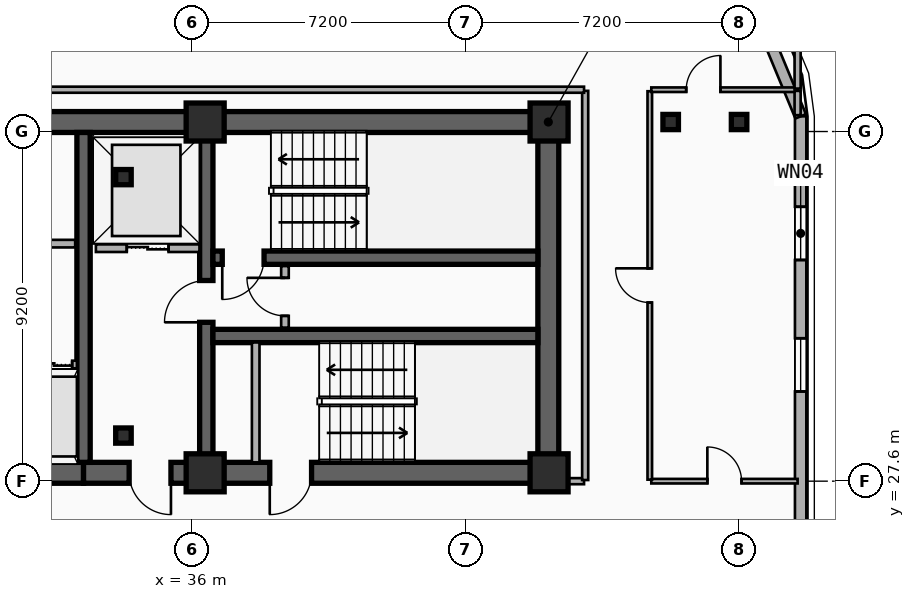
"""IFC4 building model, lengths in metres.
Left out: names, types, materials, properties, quantities, classifications, styles, units other than length and angle.
Written with IfcOpenShell. Run it as: python <this file> out.ifc"""

import sys

from ifc_helpers import new_model, si_unit, direction, frame, frame_2d, origin, origin_2d, place, context, subcontext, project, spatial, rectangle, i_section, extrude, element, fill, save


model = new_model("IFC4")
c1 = context("Model", 3, precision=1e-05, world=origin(), true_north=direction((0.0, 1.0)))
c2 = subcontext(c1, "Body", "Model", "MODEL_VIEW")
j1 = project(units=[si_unit("LENGTHUNIT", "METRE"), si_unit("PLANEANGLEUNIT", "RADIAN")], contexts=[c1])
p1 = place(None, origin())
s1 = spatial("IfcSite", under=j1, at=p1, CompositionType="ELEMENT")
p2 = place(p1, origin())
s2 = spatial("IfcBuilding", under=s1, at=p2, CompositionType="ELEMENT")
p3 = place(p2, frame((0.0, 0.0, 193.2)))
s3 = spatial("IfcBuildingStorey", under=s2, at=p3, CompositionType="ELEMENT", Elevation=193.2)
p4 = place(p3, frame((12.15, 37.05, 0.0), z_axis=(0.0, 0.0, 1.0), x_axis=(1.0, 0.0, 0.0)))
e1 = element("IfcWall", 1, at=p4, inside=s3, PredefinedType="SHEAR", context=c2, shape_type="SweptSolid", body=[
    extrude(rectangle(XDim=33.23, YDim=0.55, at=frame_2d((16.615, 0.0))), origin(), (0.0, 0.0, 1.0), 3.6),
])
p5 = place(p3, frame((33.15, 27.82, 0.0), z_axis=(0.0, 0.0, 1.0), x_axis=(-1.0, 0.0, 0.0)))
e2 = element("IfcWall", 2, at=p5, inside=s3, PredefinedType="SHEAR", context=c2, shape_type="SweptSolid", body=[
    extrude(rectangle(XDim=11.97, YDim=0.55, at=frame_2d((5.985, 0.0))), origin(), (0.0, 0.0, 1.0), 3.6),
])
p6 = place(p5, frame((6.1, 0.0, 0.0)))
e3 = element("IfcOpeningElement", 3, at=p6, cuts=e2, PredefinedType="OPENING", context=c2, shape_type="SweptSolid", body=[
    extrude(rectangle(XDim=1.6, YDim=2.2, at=frame_2d((0.8, 1.1))), frame((0.0, 0.285, 0.0), z_axis=(0.0, -1.0, 0.0), x_axis=(1.0, 0.0, 0.0)), (0.0, 0.0, 1.0), 0.57),
])
p7 = place(p3, frame((45.38, 27.82, 0.0), z_axis=(0.0, 0.0, 1.0), x_axis=(-1.0, 0.0, 0.0)))
e4 = element("IfcWall", 4, at=p7, inside=s3, PredefinedType="SHEAR", context=c2, shape_type="SweptSolid", body=[
    extrude(rectangle(XDim=12.23, YDim=0.55, at=frame_2d((6.115, 0.0))), origin(), (0.0, 0.0, 1.0), 3.6),
])
p8 = place(p7, frame((9.93, 0.0, 0.0)))
e5 = element("IfcOpeningElement", 5, at=p8, cuts=e4, PredefinedType="OPENING", context=c2, shape_type="SweptSolid", body=[
    extrude(rectangle(XDim=1.1, YDim=2.15, at=frame_2d((0.55, 1.075))), frame((0.0, 0.285, 0.0), z_axis=(0.0, -1.0, 0.0), x_axis=(1.0, 0.0, 0.0)), (0.0, 0.0, 1.0), 0.57),
])
p9 = place(p7, frame((6.23, 0.0, 0.0)))
e6 = element("IfcOpeningElement", 6, at=p9, cuts=e4, PredefinedType="OPENING", context=c2, shape_type="SweptSolid", body=[
    extrude(rectangle(XDim=1.1, YDim=2.15, at=frame_2d((0.55, 1.075))), frame((0.0, 0.285, 0.0), z_axis=(0.0, -1.0, 0.0), x_axis=(1.0, 0.0, 0.0)), (0.0, 0.0, 1.0), 0.57),
])
p10 = place(p3, frame((45.38, 28.095, 0.0), z_axis=(0.0, 0.0, 1.0), x_axis=(0.0, 1.0, 0.0)))
e7 = element("IfcWall", 7, at=p10, inside=s3, PredefinedType="SHEAR", context=c2, shape_type="SweptSolid", body=[
    extrude(rectangle(XDim=8.68, YDim=0.55, at=frame_2d((4.34, 0.0))), origin(), (0.0, 0.0, 1.0), 3.6),
])
p11 = place(p3, frame((33.15, 28.095, 0.0), z_axis=(0.0, 0.0, 1.0), x_axis=(0.0, 1.0, 0.0)))
e8 = element("IfcWall", 8, at=p11, inside=s3, PredefinedType="SHEAR", context=c2, shape_type="SweptSolid", body=[
    extrude(rectangle(XDim=8.68, YDim=0.35, at=frame_2d((4.34, 0.0))), origin(), (0.0, 0.0, 1.0), 3.6),
])
p12 = place(p3, frame((36.38, 28.095, 0.0), z_axis=(0.0, 0.0, 1.0), x_axis=(0.0, 1.0, 0.0)))
e9 = element("IfcWall", 9, at=p12, inside=s3, PredefinedType="SHEAR", context=c2, shape_type="SweptSolid", body=[
    extrude(rectangle(XDim=8.68, YDim=0.35, at=frame_2d((4.34, 0.0))), origin(), (0.0, 0.0, 1.0), 3.6),
])
p13 = place(p12, frame((3.685, 0.0, 0.0)))
e10 = element("IfcOpeningElement", 10, at=p13, cuts=e9, PredefinedType="OPENING", context=c2, shape_type="SweptSolid", body=[
    extrude(rectangle(XDim=1.1, YDim=2.15, at=frame_2d((0.55, 1.075))), frame((0.0, 0.185, 0.0), z_axis=(0.0, -1.0, 0.0), x_axis=(1.0, 0.0, 0.0)), (0.0, 0.0, 1.0), 0.37),
])
p14 = place(p3, frame((45.105, 33.48, 0.0), z_axis=(0.0, 0.0, 1.0), x_axis=(-1.0, 0.0, 0.0)))
e11 = element("IfcWall", 11, at=p14, inside=s3, PredefinedType="SHEAR", context=c2, shape_type="SweptSolid", body=[
    extrude(rectangle(XDim=8.55, YDim=0.35, at=frame_2d((4.275, 0.0))), origin(), (0.0, 0.0, 1.0), 3.6),
])
p15 = place(p14, frame((7.205, 0.0, 0.0)))
e12 = element("IfcOpeningElement", 12, at=p15, cuts=e11, PredefinedType="OPENING", context=c2, shape_type="SweptSolid", body=[
    extrude(rectangle(XDim=1.1, YDim=2.15, at=frame_2d((0.55, 1.075))), frame((0.0, 0.185, 0.0), z_axis=(0.0, -1.0, 0.0), x_axis=(1.0, 0.0, 0.0)), (0.0, 0.0, 1.0), 0.37),
])
p16 = place(p3, frame((36.555, 31.42, 0.0), z_axis=(0.0, 0.0, 1.0), x_axis=(1.0, 0.0, 0.0)))
e13 = element("IfcWall", 13, at=p16, inside=s3, PredefinedType="SHEAR", context=c2, shape_type="SweptSolid", body=[
    extrude(rectangle(XDim=8.55, YDim=0.35, at=frame_2d((4.275, 0.0))), origin(), (0.0, 0.0, 1.0), 3.6),
])
for number, where, z_axis, x_axis in (
    (14, (34.2, 28.8, 0.0), (0.0, 0.0, 1.0), (1.0, 0.0, 0.0)),
    (15, (34.2, 35.6, 0.0), (0.0, 0.0, 1.0), (1.0, 0.0, 0.0)),
):
    element("IfcColumn", number, at=place(p3, frame(where, z_axis=z_axis, x_axis=x_axis)), inside=s3, PredefinedType="COLUMN", context=c2, shape_type="SweptSolid", body=[
        extrude(i_section(OverallWidth=0.408, OverallDepth=0.4, WebThickness=0.025, FlangeThickness=0.039, FilletRadius=0.015, at=origin_2d()), origin(), (0.0, 0.0, 1.0), 3.6),
    ])
for number, where, z_axis, x_axis in (
    (16, (36.35, 27.82, 0.0), (0.0, 0.0, 1.0), (1.0, 0.0, 0.0)),
    (17, (36.35, 37.05, 0.0), (0.0, 0.0, 1.0), (1.0, 0.0, 0.0)),
    (18, (45.4, 27.82, 0.0), (0.0, 0.0, 1.0), (1.0, 0.0, 0.0)),
    (19, (45.4, 37.05, 0.0), (0.0, 0.0, 1.0), (1.0, 0.0, 0.0)),
):
    element("IfcColumn", number, at=place(p3, frame(where, z_axis=z_axis, x_axis=x_axis)), inside=s3, PredefinedType="COLUMN", context=c2, shape_type="SweptSolid", body=[
        extrude(rectangle(XDim=1.0, YDim=1.0, at=origin_2d()), origin(), (0.0, 0.0, 1.0), 3.6),
    ])
for number, where, z_axis, x_axis in (
    (20, (48.6, 37.05, 0.0), (0.0, 0.0, 1.0), (1.0, 0.0, 0.0)),
    (21, (50.4, 37.05, 0.0), (0.0, 0.0, 1.0), (1.0, 0.0, 0.0)),
):
    element("IfcColumn", number, at=place(p3, frame(where, z_axis=z_axis, x_axis=x_axis)), inside=s3, PredefinedType="COLUMN", context=c2, shape_type="SweptSolid", body=[
        extrude(i_section(OverallWidth=0.408, OverallDepth=0.4, WebThickness=0.025, FlangeThickness=0.039, FilletRadius=0.015, at=origin_2d()), origin(), (0.0, 0.0, 1.0), 3.6),
    ])
p17 = place(p3, frame((52.02, 37.2, 0.0), z_axis=(0.0, 0.0, 1.0), x_axis=(0.0, -1.0, 0.0)))
e22 = element("IfcWall", 22, at=p17, inside=s3, PredefinedType="SOLIDWALL", context=c2, shape_type="SweptSolid", body=[
    extrude(rectangle(XDim=28.6, YDim=0.3, at=frame_2d((14.3, 0.0))), origin(), (0.0, 0.0, 1.0), 3.34),
])
p18 = place(p17, frame((2.38, 0.0, 0.34)))
e23 = element("IfcOpeningElement", 23, at=p18, cuts=e22, PredefinedType="OPENING", context=c2, shape_type="SweptSolid", body=[
    extrude(rectangle(XDim=1.4, YDim=2.1, at=frame_2d((0.7, 1.05))), frame((0.0, 0.16, 0.0), z_axis=(0.0, -1.0, 0.0), x_axis=(1.0, 0.0, 0.0)), (0.0, 0.0, 1.0), 0.32),
])
p19 = place(p17, frame((5.84, 0.0, 0.34)))
e24 = element("IfcOpeningElement", 24, at=p19, cuts=e22, PredefinedType="OPENING", context=c2, shape_type="SweptSolid", body=[
    extrude(rectangle(XDim=1.4, YDim=2.1, at=frame_2d((0.7, 1.05))), frame((0.0, 0.16, 0.0), z_axis=(0.0, -1.0, 0.0), x_axis=(1.0, 0.0, 0.0)), (0.0, 0.0, 1.0), 0.32),
])
p20 = place(p17, frame((16.527, 0.0, 0.34)))
e25 = element("IfcOpeningElement", 25, at=p20, cuts=e22, PredefinedType="OPENING", context=c2, shape_type="SweptSolid", body=[
    extrude(rectangle(XDim=1.4, YDim=2.1, at=frame_2d((0.7, 1.05))), frame((0.0, 0.16, 0.0), z_axis=(0.0, -1.0, 0.0), x_axis=(1.0, 0.0, 0.0)), (0.0, 0.0, 1.0), 0.32),
])
p21 = place(p17, frame((22.403, 0.0, 0.34)))
e26 = element("IfcOpeningElement", 26, at=p21, cuts=e22, PredefinedType="OPENING", context=c2, shape_type="SweptSolid", body=[
    extrude(rectangle(XDim=1.4, YDim=2.1, at=frame_2d((0.7, 1.05))), frame((0.0, 0.16, 0.0), z_axis=(0.0, -1.0, 0.0), x_axis=(1.0, 0.0, 0.0)), (0.0, 0.0, 1.0), 0.32),
])
p22 = place(p3, frame((50.843, 40.042, 0.0), z_axis=(0.0, 0.0, 1.0), x_axis=(0.382704529509, -0.923870793506, 0.0)))
e27 = element("IfcWall", 27, at=p22, inside=s3, PredefinedType="SOLIDWALL", context=c2, shape_type="SweptSolid", body=[
    extrude(rectangle(XDim=3.077, YDim=0.3, at=frame_2d((1.538, 0.0))), origin(), (0.0, 0.0, 1.0), 3.34),
])
p23 = place(p3, frame((33.475, 33.73, 0.0), z_axis=(0.0, 0.0, 1.0), x_axis=(1.0, 0.0, 0.0)))
e28 = element("IfcWall", 28, at=p23, inside=s3, PredefinedType="PARTITIONING", context=c2, shape_type="SweptSolid", body=[
    extrude(rectangle(XDim=2.725, YDim=0.2, at=frame_2d((1.362, 0.0))), origin(), (0.0, 0.0, 1.0), 2.41),
])
p24 = place(p23, frame((0.812, 0.0, 0.0)))
e29 = element("IfcOpeningElement", 29, at=p24, cuts=e28, PredefinedType="OPENING", context=c2, shape_type="SweptSolid", body=[
    extrude(rectangle(XDim=1.1, YDim=2.15, at=frame_2d((0.55, 1.075))), frame((0.0, 0.11, 0.0), z_axis=(0.0, -1.0, 0.0), x_axis=(1.0, 0.0, 0.0)), (0.0, 0.0, 1.0), 0.22),
])
p25 = place(p3, frame((31.775, 30.67, 0.0), z_axis=(0.0, 0.0, 1.0), x_axis=(1.0, 0.0, 0.0)))
e30 = element("IfcWall", 30, at=p25, inside=s3, PredefinedType="PARTITIONING", context=c2, shape_type="SweptSolid", body=[
    extrude(rectangle(XDim=1.2, YDim=0.2, at=frame_2d((0.6, 0.0))), origin(), (0.0, 0.0, 1.0), 2.72),
])
p26 = place(p25, frame((0.125, 0.0, 0.0)))
e31 = element("IfcOpeningElement", 31, at=p26, cuts=e30, PredefinedType="OPENING", context=c2, shape_type="SweptSolid", body=[
    extrude(rectangle(XDim=0.95, YDim=2.15, at=frame_2d((0.475, 1.075))), frame((0.0, 0.11, 0.0), z_axis=(0.0, -1.0, 0.0), x_axis=(1.0, 0.0, 0.0)), (0.0, 0.0, 1.0), 0.22),
])
p27 = place(p3, frame((37.68, 28.095, 0.0), z_axis=(0.0, 0.0, 1.0), x_axis=(0.0, 1.0, 0.0)))
e32 = element("IfcWall", 32, at=p27, inside=s3, PredefinedType="PARTITIONING", context=c2, shape_type="SweptSolid", body=[
    extrude(rectangle(XDim=3.155, YDim=0.2, at=frame_2d((1.578, 0.0))), origin(), (0.0, 0.0, 1.0), 2.72),
])
p28 = place(p3, frame((38.45, 31.64, 0.0), z_axis=(0.0, 0.0, 1.0), x_axis=(0.0, 1.0, 0.0)))
e33 = element("IfcWall", 33, at=p28, inside=s3, PredefinedType="PARTITIONING", context=c2, shape_type="SweptSolid", body=[
    extrude(rectangle(XDim=1.62, YDim=0.2, at=frame_2d((0.81, 0.0))), origin(), (0.0, 0.0, 1.0), 3.34),
])
p29 = place(p28, frame((0.31, 0.0, 0.0)))
e34 = element("IfcOpeningElement", 34, at=p29, cuts=e33, PredefinedType="OPENING", context=c2, shape_type="SweptSolid", body=[
    extrude(rectangle(XDim=1.0, YDim=2.15, at=frame_2d((0.5, 1.075))), frame((0.0, 0.11, 0.0), z_axis=(0.0, -1.0, 0.0), x_axis=(1.0, 0.0, 0.0)), (0.0, 0.0, 1.0), 0.22),
])
p30 = place(p3, frame((21.59, 33.85, 0.0), z_axis=(0.0, 0.0, 1.0), x_axis=(1.0, 0.0, 0.0)))
e35 = element("IfcWall", 35, at=p30, inside=s3, PredefinedType="PARTITIONING", context=c2, shape_type="SweptSolid", body=[
    extrude(rectangle(XDim=11.34, YDim=0.2, at=frame_2d((5.67, 0.0))), origin(), (0.0, 0.0, 1.0), 2.41),
])
p31 = place(p30, frame((5.07, 0.0, 0.0)))
e36 = element("IfcOpeningElement", 36, at=p31, cuts=e35, PredefinedType="OPENING", context=c2, shape_type="SweptSolid", body=[
    extrude(rectangle(XDim=1.2, YDim=2.15, at=frame_2d((0.6, 1.075))), frame((0.0, 0.11, 0.0), z_axis=(0.0, -1.0, 0.0), x_axis=(1.0, 0.0, 0.0)), (0.0, 0.0, 1.0), 0.22),
])
p32 = place(p3, frame((48.09, 27.6, 0.0), z_axis=(0.0, 0.0, 1.0), x_axis=(1.0, 0.0, 0.0)))
e37 = element("IfcWall", 37, at=p32, inside=s3, PredefinedType="PARTITIONING", context=c2, shape_type="SweptSolid", body=[
    extrude(rectangle(XDim=3.85, YDim=0.12, at=frame_2d((1.925, 0.0))), origin(), (0.0, 0.0, 1.0), 2.67),
])
p33 = place(p32, frame((1.475, 0.0, 0.0)))
e38 = element("IfcOpeningElement", 38, at=p33, cuts=e37, PredefinedType="OPENING", context=c2, shape_type="SweptSolid", body=[
    extrude(rectangle(XDim=0.9, YDim=2.1, at=frame_2d((0.45, 1.05))), frame((0.0, 0.07, 0.0), z_axis=(0.0, -1.0, 0.0), x_axis=(1.0, 0.0, 0.0)), (0.0, 0.0, 1.0), 0.14),
])
p34 = place(p3, frame((48.05, 27.64, 0.0), z_axis=(0.0, 0.0, 1.0), x_axis=(0.0, 1.0, 0.0)))
e39 = element("IfcWall", 39, at=p34, inside=s3, PredefinedType="PARTITIONING", context=c2, shape_type="SweptSolid", body=[
    extrude(rectangle(XDim=10.22, YDim=0.12, at=frame_2d((5.11, 0.0))), origin(), (0.0, 0.0, 1.0), 2.82),
])
p35 = place(p34, frame((4.66, 0.0, 0.0)))
e40 = element("IfcOpeningElement", 40, at=p35, cuts=e39, PredefinedType="OPENING", context=c2, shape_type="SweptSolid", body=[
    extrude(rectangle(XDim=0.9, YDim=2.1, at=frame_2d((0.45, 1.05))), frame((0.0, 0.07, 0.0), z_axis=(0.0, -1.0, 0.0), x_axis=(1.0, 0.0, 0.0)), (0.0, 0.0, 1.0), 0.14),
])
p36 = place(p3, frame((48.09, 37.9, 0.0), z_axis=(0.0, 0.0, 1.0), x_axis=(1.0, 0.0, 0.0)))
e41 = element("IfcWall", 41, at=p36, inside=s3, PredefinedType="PARTITIONING", context=c2, shape_type="SweptSolid", body=[
    extrude(rectangle(XDim=3.85, YDim=0.12, at=frame_2d((1.925, 0.0))), origin(), (0.0, 0.0, 1.0), 3.34),
])
p37 = place(p36, frame((0.919, 0.0, 0.0)))
e42 = element("IfcOpeningElement", 42, at=p37, cuts=e41, PredefinedType="OPENING", context=c2, shape_type="SweptSolid", body=[
    extrude(rectangle(XDim=0.9, YDim=2.1, at=frame_2d((0.45, 1.05))), frame((0.0, 0.07, 0.0), z_axis=(0.0, -1.0, 0.0), x_axis=(1.0, 0.0, 0.0)), (0.0, 0.0, 1.0), 0.14),
])
p38 = place(p3, frame((45.41, 27.6, 0.0), z_axis=(0.0, 0.0, 1.0), x_axis=(1.0, 0.0, 0.0)))
e43 = element("IfcWall", 43, at=p38, inside=s3, PredefinedType="PARTITIONING", context=c2, shape_type="SweptSolid", body=[
    extrude(rectangle(XDim=0.91, YDim=0.16, at=frame_2d((0.455, 0.0))), origin(), (0.0, 0.0, 1.0), 2.41),
])
p39 = place(p3, frame((46.35, 27.63, 0.0), z_axis=(0.0, 0.0, 1.0), x_axis=(0.0, 1.0, 0.0)))
e44 = element("IfcWall", 44, at=p39, inside=s3, PredefinedType="PARTITIONING", context=c2, shape_type="SweptSolid", body=[
    extrude(rectangle(XDim=10.24, YDim=0.16, at=frame_2d((5.12, 0.0))), origin(), (0.0, 0.0, 1.0), 2.82),
])
p40 = place(p3, frame((11.28, 37.9, 0.0), z_axis=(0.0, 0.0, 1.0), x_axis=(1.0, 0.0, 0.0)))
e45 = element("IfcWall", 45, at=p40, inside=s3, PredefinedType="PARTITIONING", context=c2, shape_type="SweptSolid", body=[
    extrude(rectangle(XDim=35.04, YDim=0.16, at=frame_2d((17.52, 0.0))), origin(), (0.0, 0.0, 1.0), 3.34),
])
p41 = place(p3, frame((51.94, 37.93, 0.0), z_axis=(0.0, 0.0, 1.0), x_axis=(0.0, 1.0, 0.0)))
e46 = element("IfcWall", 46, at=p41, inside=s3, PredefinedType="PARTITIONING", context=c2, shape_type="SweptSolid", body=[
    extrude(rectangle(XDim=1.44, YDim=0.16, at=frame_2d((0.72, 0.0))), origin(), (0.0, 0.0, 1.0), 3.34),
])
p42 = place(p3, frame((51.94, 37.23, 0.0), z_axis=(0.0, 0.0, 1.0), x_axis=(0.0, 1.0, 0.0)))
e47 = element("IfcWall", 47, at=p42, inside=s3, PredefinedType="PARTITIONING", context=c2, shape_type="SweptSolid", body=[
    extrude(rectangle(XDim=0.64, YDim=0.16, at=frame_2d((0.32, 0.0))), origin(), (0.0, 0.0, 1.0), 3.34),
])
p43 = place(p18, origin())
e48 = element("IfcWindow", 48, at=p43, inside=s3, PartitioningType="SINGLE_PANEL", PredefinedType="WINDOW", context=c2, shape_type="SweptSolid", body=[
    extrude(rectangle(XDim=1.4, YDim=2.1, at=frame_2d((0.7, 1.05))), frame((0.0, 0.03, 0.0), z_axis=(0.0, -1.0, 0.0), x_axis=(1.0, 0.0, 0.0)), (0.0, 0.0, 1.0), 0.06),
])
fill(e23, e48)
p44 = place(p19, origin())
e49 = element("IfcWindow", 49, at=p44, inside=s3, PartitioningType="SINGLE_PANEL", PredefinedType="WINDOW", context=c2, shape_type="SweptSolid", body=[
    extrude(rectangle(XDim=1.4, YDim=2.1, at=frame_2d((0.7, 1.05))), frame((0.0, 0.03, 0.0), z_axis=(0.0, -1.0, 0.0), x_axis=(1.0, 0.0, 0.0)), (0.0, 0.0, 1.0), 0.06),
])
fill(e24, e49)
p45 = place(p24, origin())
e50 = element("IfcDoor", 50, at=p45, inside=s3, OperationType="DOUBLE_DOOR_SLIDING", PredefinedType="DOOR", context=c2, shape_type="SweptSolid", body=[
    extrude(rectangle(XDim=1.1, YDim=2.15, at=frame_2d((0.55, 1.075))), frame((0.0, 0.025, 0.0), z_axis=(0.0, -1.0, 0.0), x_axis=(1.0, 0.0, 0.0)), (0.0, 0.0, 1.0), 0.05),
])
fill(e29, e50)
p46 = place(p26, origin())
e51 = element("IfcDoor", 51, at=p46, inside=s3, OperationType="DOUBLE_DOOR_SLIDING", PredefinedType="DOOR", context=c2, shape_type="SweptSolid", body=[
    extrude(rectangle(XDim=0.95, YDim=2.15, at=frame_2d((0.475, 1.075))), frame((0.0, 0.025, 0.0), z_axis=(0.0, -1.0, 0.0), x_axis=(1.0, 0.0, 0.0)), (0.0, 0.0, 1.0), 0.05),
])
fill(e31, e51)
p47 = place(p15, origin())
e52 = element("IfcDoor", 52, at=p47, inside=s3, OperationType="SINGLE_SWING_RIGHT", PredefinedType="DOOR", context=c2, shape_type="SweptSolid", body=[
    extrude(rectangle(XDim=1.1, YDim=2.15, at=frame_2d((0.55, 1.075))), frame((0.0, 0.025, 0.0), z_axis=(0.0, -1.0, 0.0), x_axis=(1.0, 0.0, 0.0)), (0.0, 0.0, 1.0), 0.05),
])
fill(e12, e52)
p48 = place(p13, origin())
e53 = element("IfcDoor", 53, at=p48, inside=s3, OperationType="SINGLE_SWING_LEFT", PredefinedType="DOOR", context=c2, shape_type="SweptSolid", body=[
    extrude(rectangle(XDim=1.1, YDim=2.15, at=frame_2d((0.55, 1.075))), frame((0.0, 0.025, 0.0), z_axis=(0.0, -1.0, 0.0), x_axis=(1.0, 0.0, 0.0)), (0.0, 0.0, 1.0), 0.05),
])
fill(e10, e53)
p49 = place(p8, origin())
e54 = element("IfcDoor", 54, at=p49, inside=s3, OperationType="SINGLE_SWING_LEFT", PredefinedType="DOOR", context=c2, shape_type="SweptSolid", body=[
    extrude(rectangle(XDim=1.1, YDim=2.15, at=frame_2d((0.55, 1.075))), frame((0.0, 0.025, 0.0), z_axis=(0.0, -1.0, 0.0), x_axis=(1.0, 0.0, 0.0)), (0.0, 0.0, 1.0), 0.05),
])
fill(e5, e54)
p50 = place(p9, origin())
e55 = element("IfcDoor", 55, at=p50, inside=s3, OperationType="SINGLE_SWING_RIGHT", PredefinedType="DOOR", context=c2, shape_type="SweptSolid", body=[
    extrude(rectangle(XDim=1.1, YDim=2.15, at=frame_2d((0.55, 1.075))), frame((0.0, 0.025, 0.0), z_axis=(0.0, -1.0, 0.0), x_axis=(1.0, 0.0, 0.0)), (0.0, 0.0, 1.0), 0.05),
])
fill(e6, e55)
p51 = place(p29, origin())
e56 = element("IfcDoor", 56, at=p51, inside=s3, OperationType="SINGLE_SWING_RIGHT", PredefinedType="DOOR", context=c2, shape_type="SweptSolid", body=[
    extrude(rectangle(XDim=1.0, YDim=2.15, at=frame_2d((0.5, 1.075))), frame((0.0, 0.025, 0.0), z_axis=(0.0, -1.0, 0.0), x_axis=(1.0, 0.0, 0.0)), (0.0, 0.0, 1.0), 0.05),
])
fill(e34, e56)
p52 = place(p33, origin())
e57 = element("IfcDoor", 57, at=p52, inside=s3, OperationType="SINGLE_SWING_LEFT", PredefinedType="DOOR", context=c2, shape_type="SweptSolid", body=[
    extrude(rectangle(XDim=0.9, YDim=2.1, at=frame_2d((0.45, 1.05))), frame((0.0, 0.025, 0.0), z_axis=(0.0, -1.0, 0.0), x_axis=(1.0, 0.0, 0.0)), (0.0, 0.0, 1.0), 0.05),
])
fill(e38, e57)
p53 = place(p35, origin())
e58 = element("IfcDoor", 58, at=p53, inside=s3, OperationType="SINGLE_SWING_RIGHT", PredefinedType="DOOR", context=c2, shape_type="SweptSolid", body=[
    extrude(rectangle(XDim=0.9, YDim=2.1, at=frame_2d((0.45, 1.05))), frame((0.0, 0.025, 0.0), z_axis=(0.0, -1.0, 0.0), x_axis=(1.0, 0.0, 0.0)), (0.0, 0.0, 1.0), 0.05),
])
fill(e40, e58)
p54 = place(p37, origin())
e59 = element("IfcDoor", 59, at=p54, inside=s3, OperationType="SINGLE_SWING_RIGHT", PredefinedType="DOOR", context=c2, shape_type="SweptSolid", body=[
    extrude(rectangle(XDim=0.9, YDim=2.1, at=frame_2d((0.45, 1.05))), frame((0.0, 0.025, 0.0), z_axis=(0.0, -1.0, 0.0), x_axis=(1.0, 0.0, 0.0)), (0.0, 0.0, 1.0), 0.05),
])
fill(e42, e59)
save(model, sys.argv[1])
